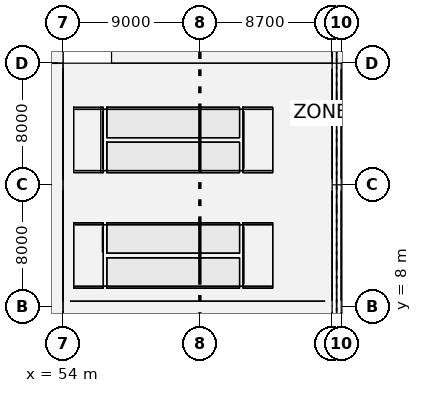
"""IFC4 building model, lengths in metres.
Left out: names, types, materials, properties, quantities, classifications, styles, units other than length and angle.
Written with IfcOpenShell. Run it as: python <this file> out.ifc"""

import sys

from ifc_helpers import new_model, si_unit, direction, frame, frame_2d, origin, origin_2d, place, context, subcontext, project, spatial, rectangle, hollow_rectangle, extrude, element, fill, save


model = new_model("IFC4")
c1 = context("Model", 3, precision=1e-05, world=origin(), true_north=direction((0.0, 1.0)))
c2 = subcontext(c1, "Body", "Model", "MODEL_VIEW")
j1 = project(units=[si_unit("LENGTHUNIT", "METRE"), si_unit("PLANEANGLEUNIT", "RADIAN")], contexts=[c1])
p1 = place(None, origin())
s1 = spatial("IfcSite", under=j1, at=p1, CompositionType="ELEMENT")
p2 = place(p1, origin())
s2 = spatial("IfcBuilding", under=s1, at=p2, CompositionType="ELEMENT")
p3 = place(p2, origin())
s3 = spatial("IfcBuildingStorey", under=s2, at=p3, CompositionType="ELEMENT", Elevation=0.0)
for number, where, z_axis, x_axis in (
    (1, (54.0, 8.0, -0.5), (0.0, 0.0, 1.0), (1.0, 0.0, 0.0)),
    (2, (54.0, 16.0, -0.5), (0.0, 0.0, 1.0), (1.0, 0.0, 0.0)),
    (3, (54.0, 24.0, -0.5), (0.0, 0.0, 1.0), (1.0, 0.0, 0.0)),
    (4, (63.0, 8.0, -0.5), (0.0, 0.0, 1.0), (1.0, 0.0, 0.0)),
    (5, (63.0, 16.0, -0.5), (0.0, 0.0, 1.0), (1.0, 0.0, 0.0)),
    (6, (63.0, 24.0, -0.5), (0.0, 0.0, 1.0), (1.0, 0.0, 0.0)),
):
    element("IfcColumn", number, at=place(p3, frame(where, z_axis=z_axis, x_axis=x_axis)), inside=s3, PredefinedType="COLUMN", context=c2, shape_type="SweptSolid", body=[
        extrude(rectangle(XDim=0.65, YDim=0.65, at=origin_2d()), origin(), (0.0, 0.0, 1.0), 6.8),
    ])
for number, where, z_axis, x_axis in (
    (7, (71.7, 8.0, -0.5), (0.0, 0.0, 1.0), (1.0, 0.0, 0.0)),
    (8, (71.7, 16.0, -0.5), (0.0, 0.0, 1.0), (1.0, 0.0, 0.0)),
    (9, (71.7, 24.0, -0.5), (0.0, 0.0, 1.0), (1.0, 0.0, 0.0)),
    (10, (72.3, 8.0, -0.5), (0.0, 0.0, 1.0), (1.0, 0.0, 0.0)),
    (11, (72.3, 16.0, -0.5), (0.0, 0.0, 1.0), (1.0, 0.0, 0.0)),
    (12, (72.3, 24.0, -0.5), (0.0, 0.0, 1.0), (1.0, 0.0, 0.0)),
):
    element("IfcColumn", number, at=place(p3, frame(where, z_axis=z_axis, x_axis=x_axis)), inside=s3, PredefinedType="COLUMN", context=c2, shape_type="SweptSolid", body=[
        extrude(rectangle(XDim=0.55, YDim=0.75, at=origin_2d()), origin(), (0.0, 0.0, 1.0), 6.8),
    ])
p4 = place(p3, frame((45.375, 24.0, 0.0), z_axis=(0.0, 0.0, 1.0), x_axis=(1.0, 0.0, 0.0)))
e13 = element("IfcWall", 13, at=p4, inside=s3, PredefinedType="SOLIDWALL", context=c2, shape_type="SweptSolid", body=[
    extrude(rectangle(XDim=8.3, YDim=0.38, at=frame_2d((4.15, 0.0))), origin(), (0.0, 0.0, 1.0), 5.08),
])
p5 = place(p4, frame((3.35, 0.0, 3.59)))
e14 = element("IfcOpeningElement", 14, at=p5, cuts=e13, PredefinedType="OPENING", context=c2, shape_type="SweptSolid", body=[
    extrude(rectangle(XDim=1.6, YDim=1.45, at=frame_2d((0.8, 0.725))), frame((0.0, 0.2, 0.0), z_axis=(0.0, -1.0, 0.0), x_axis=(1.0, 0.0, 0.0)), (0.0, 0.0, 1.0), 0.4),
])
p6 = place(p3, frame((71.7, 24.375, 0.0), z_axis=(0.0, 0.0, 1.0), x_axis=(0.0, 1.0, 0.0)))
e15 = element("IfcWall", 15, at=p6, inside=s3, PredefinedType="SOLIDWALL", context=c2, shape_type="SweptSolid", body=[
    extrude(rectangle(XDim=5.8, YDim=0.38, at=frame_2d((2.9, 0.0))), origin(), (0.0, 0.0, 1.0), 5.08),
])
p7 = place(p6, frame((2.825, 0.0, 3.59)))
e16 = element("IfcOpeningElement", 16, at=p7, cuts=e15, PredefinedType="OPENING", context=c2, shape_type="SweptSolid", body=[
    extrude(rectangle(XDim=1.6, YDim=1.45, at=frame_2d((0.8, 0.725))), frame((0.0, 0.2, 0.0), z_axis=(0.0, -1.0, 0.0), x_axis=(1.0, 0.0, 0.0)), (0.0, 0.0, 1.0), 0.4),
])
p8 = place(p3, frame((54.0, 0.325, 0.0), z_axis=(0.0, 0.0, 1.0), x_axis=(0.0, 1.0, 0.0)))
e17 = element("IfcWall", 17, at=p8, inside=s3, PredefinedType="SOLIDWALL", context=c2, shape_type="SweptSolid", body=[
    extrude(rectangle(XDim=7.35, YDim=0.34, at=frame_2d((3.675, 0.0))), origin(), (0.0, 0.0, 1.0), 5.23),
])
p9 = place(p8, frame((1.55, 0.0, 0.85)))
e18 = element("IfcOpeningElement", 18, at=p9, cuts=e17, PredefinedType="OPENING", context=c2, shape_type="SweptSolid", body=[
    extrude(rectangle(XDim=1.8, YDim=3.15, at=frame_2d((0.9, 1.575))), frame((0.0, 0.18, 0.0), z_axis=(0.0, -1.0, 0.0), x_axis=(1.0, 0.0, 0.0)), (0.0, 0.0, 1.0), 0.36),
])
p10 = place(p8, frame((4.0, 0.0, 0.85)))
e19 = element("IfcOpeningElement", 19, at=p10, cuts=e17, PredefinedType="OPENING", context=c2, shape_type="SweptSolid", body=[
    extrude(rectangle(XDim=1.8, YDim=3.15, at=frame_2d((0.9, 1.575))), frame((0.0, 0.18, 0.0), z_axis=(0.0, -1.0, 0.0), x_axis=(1.0, 0.0, 0.0)), (0.0, 0.0, 1.0), 0.36),
])
p11 = place(p3, frame((54.0, 8.325, 0.0), z_axis=(0.0, 0.0, 1.0), x_axis=(0.0, 1.0, 0.0)))
e20 = element("IfcWall", 20, at=p11, inside=s3, PredefinedType="SOLIDWALL", context=c2, shape_type="SweptSolid", body=[
    extrude(rectangle(XDim=7.35, YDim=0.34, at=frame_2d((3.675, 0.0))), origin(), (0.0, 0.0, 1.0), 5.23),
])
p12 = place(p11, frame((1.55, 0.0, 0.85)))
e21 = element("IfcOpeningElement", 21, at=p12, cuts=e20, PredefinedType="OPENING", context=c2, shape_type="SweptSolid", body=[
    extrude(rectangle(XDim=1.8, YDim=3.15, at=frame_2d((0.9, 1.575))), frame((0.0, 0.18, 0.0), z_axis=(0.0, -1.0, 0.0), x_axis=(1.0, 0.0, 0.0)), (0.0, 0.0, 1.0), 0.36),
])
p13 = place(p11, frame((4.0, 0.0, 0.85)))
e22 = element("IfcOpeningElement", 22, at=p13, cuts=e20, PredefinedType="OPENING", context=c2, shape_type="SweptSolid", body=[
    extrude(rectangle(XDim=1.8, YDim=3.15, at=frame_2d((0.9, 1.575))), frame((0.0, 0.18, 0.0), z_axis=(0.0, -1.0, 0.0), x_axis=(1.0, 0.0, 0.0)), (0.0, 0.0, 1.0), 0.36),
])
p14 = place(p3, frame((54.0, 16.325, 0.0), z_axis=(0.0, 0.0, 1.0), x_axis=(0.0, 1.0, 0.0)))
e23 = element("IfcWall", 23, at=p14, inside=s3, PredefinedType="SOLIDWALL", context=c2, shape_type="SweptSolid", body=[
    extrude(rectangle(XDim=7.35, YDim=0.34, at=frame_2d((3.675, 0.0))), origin(), (0.0, 0.0, 1.0), 5.23),
])
p15 = place(p14, frame((1.55, 0.0, 0.85)))
e24 = element("IfcOpeningElement", 24, at=p15, cuts=e23, PredefinedType="OPENING", context=c2, shape_type="SweptSolid", body=[
    extrude(rectangle(XDim=1.8, YDim=3.15, at=frame_2d((0.9, 1.575))), frame((0.0, 0.18, 0.0), z_axis=(0.0, -1.0, 0.0), x_axis=(1.0, 0.0, 0.0)), (0.0, 0.0, 1.0), 0.36),
])
p16 = place(p14, frame((4.0, 0.0, 0.85)))
e25 = element("IfcOpeningElement", 25, at=p16, cuts=e23, PredefinedType="OPENING", context=c2, shape_type="SweptSolid", body=[
    extrude(rectangle(XDim=1.8, YDim=3.15, at=frame_2d((0.9, 1.575))), frame((0.0, 0.18, 0.0), z_axis=(0.0, -1.0, 0.0), x_axis=(1.0, 0.0, 0.0)), (0.0, 0.0, 1.0), 0.36),
])
p17 = place(p3, frame((71.7, 0.375, 0.0), z_axis=(0.0, 0.0, 1.0), x_axis=(0.0, 1.0, 0.0)))
e26 = element("IfcWall", 26, at=p17, inside=s3, PredefinedType="SOLIDWALL", context=c2, shape_type="SweptSolid", body=[
    extrude(rectangle(XDim=7.25, YDim=0.34, at=frame_2d((3.625, 0.0))), origin(), (0.0, 0.0, 1.0), 4.98),
])
p18 = place(p17, frame((1.517, 0.0, 0.85)))
e27 = element("IfcOpeningElement", 27, at=p18, cuts=e26, PredefinedType="OPENING", context=c2, shape_type="SweptSolid", body=[
    extrude(rectangle(XDim=1.8, YDim=3.15, at=frame_2d((0.9, 1.575))), frame((0.0, 0.18, 0.0), z_axis=(0.0, -1.0, 0.0), x_axis=(1.0, 0.0, 0.0)), (0.0, 0.0, 1.0), 0.36),
])
p19 = place(p17, frame((3.933, 0.0, 0.85)))
e28 = element("IfcOpeningElement", 28, at=p19, cuts=e26, PredefinedType="OPENING", context=c2, shape_type="SweptSolid", body=[
    extrude(rectangle(XDim=1.8, YDim=3.15, at=frame_2d((0.9, 1.575))), frame((0.0, 0.18, 0.0), z_axis=(0.0, -1.0, 0.0), x_axis=(1.0, 0.0, 0.0)), (0.0, 0.0, 1.0), 0.36),
])
p20 = place(p3, frame((71.7, 8.375, 0.0), z_axis=(0.0, 0.0, 1.0), x_axis=(0.0, 1.0, 0.0)))
e29 = element("IfcWall", 29, at=p20, inside=s3, PredefinedType="SOLIDWALL", context=c2, shape_type="SweptSolid", body=[
    extrude(rectangle(XDim=7.25, YDim=0.34, at=frame_2d((3.625, 0.0))), origin(), (0.0, 0.0, 1.0), 4.98),
])
p21 = place(p20, frame((1.517, 0.0, 0.85)))
e30 = element("IfcOpeningElement", 30, at=p21, cuts=e29, PredefinedType="OPENING", context=c2, shape_type="SweptSolid", body=[
    extrude(rectangle(XDim=1.8, YDim=3.15, at=frame_2d((0.9, 1.575))), frame((0.0, 0.18, 0.0), z_axis=(0.0, -1.0, 0.0), x_axis=(1.0, 0.0, 0.0)), (0.0, 0.0, 1.0), 0.36),
])
p22 = place(p20, frame((3.933, 0.0, 0.85)))
e31 = element("IfcOpeningElement", 31, at=p22, cuts=e29, PredefinedType="OPENING", context=c2, shape_type="SweptSolid", body=[
    extrude(rectangle(XDim=1.8, YDim=3.15, at=frame_2d((0.9, 1.575))), frame((0.0, 0.18, 0.0), z_axis=(0.0, -1.0, 0.0), x_axis=(1.0, 0.0, 0.0)), (0.0, 0.0, 1.0), 0.36),
])
p23 = place(p3, frame((71.7, 16.375, 0.0), z_axis=(0.0, 0.0, 1.0), x_axis=(0.0, 1.0, 0.0)))
e32 = element("IfcWall", 32, at=p23, inside=s3, PredefinedType="SOLIDWALL", context=c2, shape_type="SweptSolid", body=[
    extrude(rectangle(XDim=7.25, YDim=0.34, at=frame_2d((3.625, 0.0))), origin(), (0.0, 0.0, 1.0), 4.98),
])
p24 = place(p23, frame((1.517, 0.0, 0.85)))
e33 = element("IfcOpeningElement", 33, at=p24, cuts=e32, PredefinedType="OPENING", context=c2, shape_type="SweptSolid", body=[
    extrude(rectangle(XDim=1.8, YDim=3.15, at=frame_2d((0.9, 1.575))), frame((0.0, 0.18, 0.0), z_axis=(0.0, -1.0, 0.0), x_axis=(1.0, 0.0, 0.0)), (0.0, 0.0, 1.0), 0.36),
])
p25 = place(p23, frame((3.933, 0.0, 0.85)))
e34 = element("IfcOpeningElement", 34, at=p25, cuts=e32, PredefinedType="OPENING", context=c2, shape_type="SweptSolid", body=[
    extrude(rectangle(XDim=1.8, YDim=3.15, at=frame_2d((0.9, 1.575))), frame((0.0, 0.18, 0.0), z_axis=(0.0, -1.0, 0.0), x_axis=(1.0, 0.0, 0.0)), (0.0, 0.0, 1.0), 0.36),
])
p26 = place(p3, frame((72.3, 0.375, 0.0), z_axis=(0.0, 0.0, 1.0), x_axis=(0.0, 1.0, 0.0)))
e35 = element("IfcWall", 35, at=p26, inside=s3, PredefinedType="SOLIDWALL", context=c2, shape_type="SweptSolid", body=[
    extrude(rectangle(XDim=7.25, YDim=0.34, at=frame_2d((3.625, 0.0))), origin(), (0.0, 0.0, 1.0), 5.1),
])
p27 = place(p26, frame((1.517, 0.0, 0.85)))
e36 = element("IfcOpeningElement", 36, at=p27, cuts=e35, PredefinedType="OPENING", context=c2, shape_type="SweptSolid", body=[
    extrude(rectangle(XDim=1.8, YDim=3.15, at=frame_2d((0.9, 1.575))), frame((0.0, 0.18, 0.0), z_axis=(0.0, -1.0, 0.0), x_axis=(1.0, 0.0, 0.0)), (0.0, 0.0, 1.0), 0.36),
])
p28 = place(p26, frame((3.933, 0.0, 0.85)))
e37 = element("IfcOpeningElement", 37, at=p28, cuts=e35, PredefinedType="OPENING", context=c2, shape_type="SweptSolid", body=[
    extrude(rectangle(XDim=1.8, YDim=3.15, at=frame_2d((0.9, 1.575))), frame((0.0, 0.18, 0.0), z_axis=(0.0, -1.0, 0.0), x_axis=(1.0, 0.0, 0.0)), (0.0, 0.0, 1.0), 0.36),
])
p29 = place(p3, frame((72.3, 8.375, 0.0), z_axis=(0.0, 0.0, 1.0), x_axis=(0.0, 1.0, 0.0)))
e38 = element("IfcWall", 38, at=p29, inside=s3, PredefinedType="SOLIDWALL", context=c2, shape_type="SweptSolid", body=[
    extrude(rectangle(XDim=7.25, YDim=0.34, at=frame_2d((3.625, 0.0))), origin(), (0.0, 0.0, 1.0), 5.1),
])
p30 = place(p29, frame((1.517, 0.0, 0.85)))
e39 = element("IfcOpeningElement", 39, at=p30, cuts=e38, PredefinedType="OPENING", context=c2, shape_type="SweptSolid", body=[
    extrude(rectangle(XDim=1.8, YDim=3.15, at=frame_2d((0.9, 1.575))), frame((0.0, 0.18, 0.0), z_axis=(0.0, -1.0, 0.0), x_axis=(1.0, 0.0, 0.0)), (0.0, 0.0, 1.0), 0.36),
])
p31 = place(p29, frame((3.933, 0.0, 0.85)))
e40 = element("IfcOpeningElement", 40, at=p31, cuts=e38, PredefinedType="OPENING", context=c2, shape_type="SweptSolid", body=[
    extrude(rectangle(XDim=1.8, YDim=3.15, at=frame_2d((0.9, 1.575))), frame((0.0, 0.18, 0.0), z_axis=(0.0, -1.0, 0.0), x_axis=(1.0, 0.0, 0.0)), (0.0, 0.0, 1.0), 0.36),
])
p32 = place(p3, frame((72.3, 16.375, 0.0), z_axis=(0.0, 0.0, 1.0), x_axis=(0.0, 1.0, 0.0)))
e41 = element("IfcWall", 41, at=p32, inside=s3, PredefinedType="SOLIDWALL", context=c2, shape_type="SweptSolid", body=[
    extrude(rectangle(XDim=7.25, YDim=0.34, at=frame_2d((3.625, 0.0))), origin(), (0.0, 0.0, 1.0), 5.1),
])
p33 = place(p32, frame((1.517, 0.0, 0.85)))
e42 = element("IfcOpeningElement", 42, at=p33, cuts=e41, PredefinedType="OPENING", context=c2, shape_type="SweptSolid", body=[
    extrude(rectangle(XDim=1.8, YDim=3.15, at=frame_2d((0.9, 1.575))), frame((0.0, 0.18, 0.0), z_axis=(0.0, -1.0, 0.0), x_axis=(1.0, 0.0, 0.0)), (0.0, 0.0, 1.0), 0.36),
])
p34 = place(p32, frame((3.933, 0.0, 0.85)))
e43 = element("IfcOpeningElement", 43, at=p34, cuts=e41, PredefinedType="OPENING", context=c2, shape_type="SweptSolid", body=[
    extrude(rectangle(XDim=1.8, YDim=3.15, at=frame_2d((0.9, 1.575))), frame((0.0, 0.18, 0.0), z_axis=(0.0, -1.0, 0.0), x_axis=(1.0, 0.0, 0.0)), (0.0, 0.0, 1.0), 0.36),
])
for number, where, z_axis, x_axis in (
    (44, (54.88, 9.36, -0.5), (0.0, 0.0, 1.0), (1.0, 0.0, 0.0)),
    (45, (56.42, 11.35, -0.5), (0.0, 0.0, 1.0), (1.0, 0.0, 0.0)),
    (46, (54.88, 13.34, -0.5), (0.0, 0.0, 1.0), (1.0, 0.0, 0.0)),
):
    element("IfcColumn", number, at=place(p3, frame(where, z_axis=z_axis, x_axis=x_axis)), inside=s3, PredefinedType="COLUMN", context=c2, shape_type="SweptSolid", body=[
        extrude(hollow_rectangle(XDim=0.2, YDim=0.2, WallThickness=0.01, InnerFilletRadius=0.01, OuterFilletRadius=0.02, at=origin_2d()), origin(), (0.0, 0.0, 1.0), 3.63),
    ])
for number, where, z_axis, x_axis in (
    (47, (67.612, 9.36, -0.5), (0.0, 0.0, 1.0), (1.0, 0.0, 0.0)),
    (48, (66.072, 11.35, -0.5), (0.0, 0.0, 1.0), (1.0, 0.0, 0.0)),
    (49, (67.612, 13.34, -0.5), (0.0, 0.0, 1.0), (1.0, 0.0, 0.0)),
):
    element("IfcColumn", number, at=place(p3, frame(where, z_axis=z_axis, x_axis=x_axis)), inside=s3, PredefinedType="COLUMN", context=c2, shape_type="SweptSolid", body=[
        extrude(hollow_rectangle(XDim=0.2, YDim=0.2, WallThickness=0.01, InnerFilletRadius=0.01, OuterFilletRadius=0.02, at=origin_2d()), origin(), (0.0, 0.0, 1.0), 3.105),
    ])
p35 = place(p3, frame((54.75, 9.33, -0.5), z_axis=(0.0, 0.0, 1.0), x_axis=(1.0, 0.0, 0.0)))
e50 = element("IfcWall", 50, at=p35, inside=s3, PredefinedType="SOLIDWALL", context=c2, shape_type="SweptSolid", body=[
    extrude(rectangle(XDim=12.992, YDim=0.25, at=frame_2d((6.496, 0.0))), origin(), (0.0, 0.0, 1.0), 3.105),
])
p36 = place(p3, frame((54.75, 13.37, -0.5), z_axis=(0.0, 0.0, 1.0), x_axis=(1.0, 0.0, 0.0)))
e51 = element("IfcWall", 51, at=p36, inside=s3, PredefinedType="SOLIDWALL", context=c2, shape_type="SweptSolid", body=[
    extrude(rectangle(XDim=12.992, YDim=0.25, at=frame_2d((6.496, 0.0))), origin(), (0.0, 0.0, 1.0), 3.63),
])
p37 = place(p3, frame((65.892, 9.455, -0.5), z_axis=(0.0, 0.0, 1.0), x_axis=(0.0, 1.0, 0.0)))
e52 = element("IfcWall", 52, at=p37, inside=s3, PredefinedType="SOLIDWALL", context=c2, shape_type="SweptSolid", body=[
    extrude(rectangle(XDim=3.79, YDim=0.25, at=frame_2d((1.895, 0.0))), origin(), (0.0, 0.0, 1.0), 2.91),
])
p38 = place(p3, frame((56.6, 11.55, -0.5), z_axis=(0.0, 0.0, 1.0), x_axis=(0.0, 1.0, 0.0)))
e53 = element("IfcWall", 53, at=p38, inside=s3, PredefinedType="SOLIDWALL", context=c2, shape_type="SweptSolid", body=[
    extrude(rectangle(XDim=1.695, YDim=0.25, at=frame_2d((0.848, 0.0))), origin(), (0.0, 0.0, 1.0), 3.435),
])
p39 = place(p3, frame((56.6, 17.055, -0.5), z_axis=(0.0, 0.0, 1.0), x_axis=(0.0, 1.0, 0.0)))
e54 = element("IfcWall", 54, at=p39, inside=s3, PredefinedType="SOLIDWALL", context=c2, shape_type="SweptSolid", body=[
    extrude(rectangle(XDim=3.79, YDim=0.25, at=frame_2d((1.895, 0.0))), origin(), (0.0, 0.0, 1.0), 3.435),
])
for number, where, z_axis, x_axis in (
    (55, (54.88, 16.96, -0.5), (0.0, 0.0, 1.0), (1.0, 0.0, 0.0)),
    (56, (56.6, 18.95, -0.5), (0.0, 0.0, 1.0), (1.0, 0.0, 0.0)),
    (57, (54.88, 20.94, -0.5), (0.0, 0.0, 1.0), (1.0, 0.0, 0.0)),
):
    element("IfcColumn", number, at=place(p3, frame(where, z_axis=z_axis, x_axis=x_axis)), inside=s3, PredefinedType="COLUMN", context=c2, shape_type="SweptSolid", body=[
        extrude(hollow_rectangle(XDim=0.2, YDim=0.2, WallThickness=0.01, InnerFilletRadius=0.01, OuterFilletRadius=0.02, at=origin_2d()), origin(), (0.0, 0.0, 1.0), 6.78),
    ])
for number, where, z_axis, x_axis in (
    (58, (67.612, 16.96, -0.5), (0.0, 0.0, 1.0), (1.0, 0.0, 0.0)),
    (59, (66.072, 18.95, -0.5), (0.0, 0.0, 1.0), (1.0, 0.0, 0.0)),
    (60, (67.612, 20.94, -0.5), (0.0, 0.0, 1.0), (1.0, 0.0, 0.0)),
):
    element("IfcColumn", number, at=place(p3, frame(where, z_axis=z_axis, x_axis=x_axis)), inside=s3, PredefinedType="COLUMN", context=c2, shape_type="SweptSolid", body=[
        extrude(hollow_rectangle(XDim=0.2, YDim=0.2, WallThickness=0.01, InnerFilletRadius=0.01, OuterFilletRadius=0.02, at=origin_2d()), origin(), (0.0, 0.0, 1.0), 6.255),
    ])
p40 = place(p3, frame((54.75, 16.93, -0.5), z_axis=(0.0, 0.0, 1.0), x_axis=(1.0, 0.0, 0.0)))
e61 = element("IfcWall", 61, at=p40, inside=s3, PredefinedType="SOLIDWALL", context=c2, shape_type="SweptSolid", body=[
    extrude(rectangle(XDim=12.992, YDim=0.25, at=frame_2d((6.496, 0.0))), origin(), (0.0, 0.0, 1.0), 6.255),
])
p41 = place(p3, frame((54.75, 20.97, -0.5), z_axis=(0.0, 0.0, 1.0), x_axis=(1.0, 0.0, 0.0)))
e62 = element("IfcWall", 62, at=p41, inside=s3, PredefinedType="SOLIDWALL", context=c2, shape_type="SweptSolid", body=[
    extrude(rectangle(XDim=12.992, YDim=0.25, at=frame_2d((6.496, 0.0))), origin(), (0.0, 0.0, 1.0), 6.78),
])
p42 = place(p3, frame((65.892, 17.055, -0.5), z_axis=(0.0, 0.0, 1.0), x_axis=(0.0, 1.0, 0.0)))
e63 = element("IfcWall", 63, at=p42, inside=s3, PredefinedType="SOLIDWALL", context=c2, shape_type="SweptSolid", body=[
    extrude(rectangle(XDim=3.79, YDim=0.25, at=frame_2d((1.895, 0.0))), origin(), (0.0, 0.0, 1.0), 6.06),
])
p43 = place(p3, frame((54.45, 8.35, 0.0), z_axis=(0.0, 0.0, 1.0), x_axis=(1.0, 0.0, 0.0)))
e64 = element("IfcWall", 64, at=p43, inside=s3, PredefinedType="STANDARD", context=c2, shape_type="SweptSolid", body=[
    extrude(rectangle(XDim=16.8, YDim=0.195, at=frame_2d((8.4, 0.0))), origin(), (0.0, 0.0, 1.0), 5.95),
])
p44 = place(p43, frame((3.375, 0.0, 0.0)))
e65 = element("IfcOpeningElement", 65, at=p44, cuts=e64, PredefinedType="OPENING", context=c2, shape_type="SweptSolid", body=[
    extrude(rectangle(XDim=1.8, YDim=2.3, at=frame_2d((0.9, 1.15))), frame((0.0, 0.107, 0.0), z_axis=(0.0, -1.0, 0.0), x_axis=(1.0, 0.0, 0.0)), (0.0, 0.0, 1.0), 0.215),
])
p45 = place(p12, origin())
e66 = element("IfcWindow", 66, at=p45, inside=s3, PartitioningType="DOUBLE_PANEL_VERTICAL", PredefinedType="WINDOW", context=c2, shape_type="SweptSolid", body=[
    extrude(rectangle(XDim=1.8, YDim=3.15, at=frame_2d((0.9, 1.575))), frame((0.0, 0.03, 0.0), z_axis=(0.0, -1.0, 0.0), x_axis=(1.0, 0.0, 0.0)), (0.0, 0.0, 1.0), 0.06),
])
fill(e21, e66)
p46 = place(p13, origin())
e67 = element("IfcWindow", 67, at=p46, inside=s3, PartitioningType="DOUBLE_PANEL_VERTICAL", PredefinedType="WINDOW", context=c2, shape_type="SweptSolid", body=[
    extrude(rectangle(XDim=1.8, YDim=3.15, at=frame_2d((0.9, 1.575))), frame((0.0, 0.03, 0.0), z_axis=(0.0, -1.0, 0.0), x_axis=(1.0, 0.0, 0.0)), (0.0, 0.0, 1.0), 0.06),
])
fill(e22, e67)
p47 = place(p15, origin())
e68 = element("IfcWindow", 68, at=p47, inside=s3, PartitioningType="DOUBLE_PANEL_VERTICAL", PredefinedType="WINDOW", context=c2, shape_type="SweptSolid", body=[
    extrude(rectangle(XDim=1.8, YDim=3.15, at=frame_2d((0.9, 1.575))), frame((0.0, 0.03, 0.0), z_axis=(0.0, -1.0, 0.0), x_axis=(1.0, 0.0, 0.0)), (0.0, 0.0, 1.0), 0.06),
])
fill(e24, e68)
p48 = place(p16, origin())
e69 = element("IfcWindow", 69, at=p48, inside=s3, PartitioningType="DOUBLE_PANEL_VERTICAL", PredefinedType="WINDOW", context=c2, shape_type="SweptSolid", body=[
    extrude(rectangle(XDim=1.8, YDim=3.15, at=frame_2d((0.9, 1.575))), frame((0.0, 0.03, 0.0), z_axis=(0.0, -1.0, 0.0), x_axis=(1.0, 0.0, 0.0)), (0.0, 0.0, 1.0), 0.06),
])
fill(e25, e69)
p49 = place(p21, origin())
e70 = element("IfcWindow", 70, at=p49, inside=s3, PartitioningType="DOUBLE_PANEL_VERTICAL", PredefinedType="WINDOW", context=c2, shape_type="SweptSolid", body=[
    extrude(rectangle(XDim=1.8, YDim=3.15, at=frame_2d((0.9, 1.575))), frame((0.0, 0.03, 0.0), z_axis=(0.0, -1.0, 0.0), x_axis=(1.0, 0.0, 0.0)), (0.0, 0.0, 1.0), 0.06),
])
fill(e30, e70)
p50 = place(p22, origin())
e71 = element("IfcWindow", 71, at=p50, inside=s3, PartitioningType="DOUBLE_PANEL_VERTICAL", PredefinedType="WINDOW", context=c2, shape_type="SweptSolid", body=[
    extrude(rectangle(XDim=1.8, YDim=3.15, at=frame_2d((0.9, 1.575))), frame((0.0, 0.03, 0.0), z_axis=(0.0, -1.0, 0.0), x_axis=(1.0, 0.0, 0.0)), (0.0, 0.0, 1.0), 0.06),
])
fill(e31, e71)
p51 = place(p24, origin())
e72 = element("IfcWindow", 72, at=p51, inside=s3, PartitioningType="DOUBLE_PANEL_VERTICAL", PredefinedType="WINDOW", context=c2, shape_type="SweptSolid", body=[
    extrude(rectangle(XDim=1.8, YDim=3.15, at=frame_2d((0.9, 1.575))), frame((0.0, 0.03, 0.0), z_axis=(0.0, -1.0, 0.0), x_axis=(1.0, 0.0, 0.0)), (0.0, 0.0, 1.0), 0.06),
])
fill(e33, e72)
p52 = place(p25, origin())
e73 = element("IfcWindow", 73, at=p52, inside=s3, PartitioningType="DOUBLE_PANEL_VERTICAL", PredefinedType="WINDOW", context=c2, shape_type="SweptSolid", body=[
    extrude(rectangle(XDim=1.8, YDim=3.15, at=frame_2d((0.9, 1.575))), frame((0.0, 0.03, 0.0), z_axis=(0.0, -1.0, 0.0), x_axis=(1.0, 0.0, 0.0)), (0.0, 0.0, 1.0), 0.06),
])
fill(e34, e73)
p53 = place(p30, origin())
e74 = element("IfcWindow", 74, at=p53, inside=s3, PartitioningType="DOUBLE_PANEL_VERTICAL", PredefinedType="WINDOW", context=c2, shape_type="SweptSolid", body=[
    extrude(rectangle(XDim=1.8, YDim=3.15, at=frame_2d((0.9, 1.575))), frame((0.0, 0.03, 0.0), z_axis=(0.0, -1.0, 0.0), x_axis=(1.0, 0.0, 0.0)), (0.0, 0.0, 1.0), 0.06),
])
fill(e39, e74)
p54 = place(p31, origin())
e75 = element("IfcWindow", 75, at=p54, inside=s3, PartitioningType="DOUBLE_PANEL_VERTICAL", PredefinedType="WINDOW", context=c2, shape_type="SweptSolid", body=[
    extrude(rectangle(XDim=1.8, YDim=3.15, at=frame_2d((0.9, 1.575))), frame((0.0, 0.03, 0.0), z_axis=(0.0, -1.0, 0.0), x_axis=(1.0, 0.0, 0.0)), (0.0, 0.0, 1.0), 0.06),
])
fill(e40, e75)
p55 = place(p33, origin())
e76 = element("IfcWindow", 76, at=p55, inside=s3, PartitioningType="DOUBLE_PANEL_VERTICAL", PredefinedType="WINDOW", context=c2, shape_type="SweptSolid", body=[
    extrude(rectangle(XDim=1.8, YDim=3.15, at=frame_2d((0.9, 1.575))), frame((0.0, 0.03, 0.0), z_axis=(0.0, -1.0, 0.0), x_axis=(1.0, 0.0, 0.0)), (0.0, 0.0, 1.0), 0.06),
])
fill(e42, e76)
p56 = place(p34, origin())
e77 = element("IfcWindow", 77, at=p56, inside=s3, PartitioningType="DOUBLE_PANEL_VERTICAL", PredefinedType="WINDOW", context=c2, shape_type="SweptSolid", body=[
    extrude(rectangle(XDim=1.8, YDim=3.15, at=frame_2d((0.9, 1.575))), frame((0.0, 0.03, 0.0), z_axis=(0.0, -1.0, 0.0), x_axis=(1.0, 0.0, 0.0)), (0.0, 0.0, 1.0), 0.06),
])
fill(e43, e77)
p57 = place(p44, origin())
e78 = element("IfcDoor", 78, at=p57, inside=s3, OperationType="SINGLE_SWING_LEFT", PredefinedType="DOOR", context=c2, shape_type="SweptSolid", body=[
    extrude(rectangle(XDim=1.8, YDim=2.3, at=frame_2d((0.9, 1.15))), frame((0.0, 0.025, 0.0), z_axis=(0.0, -1.0, 0.0), x_axis=(1.0, 0.0, 0.0)), (0.0, 0.0, 1.0), 0.05),
])
fill(e65, e78)
save(model, sys.argv[1])
